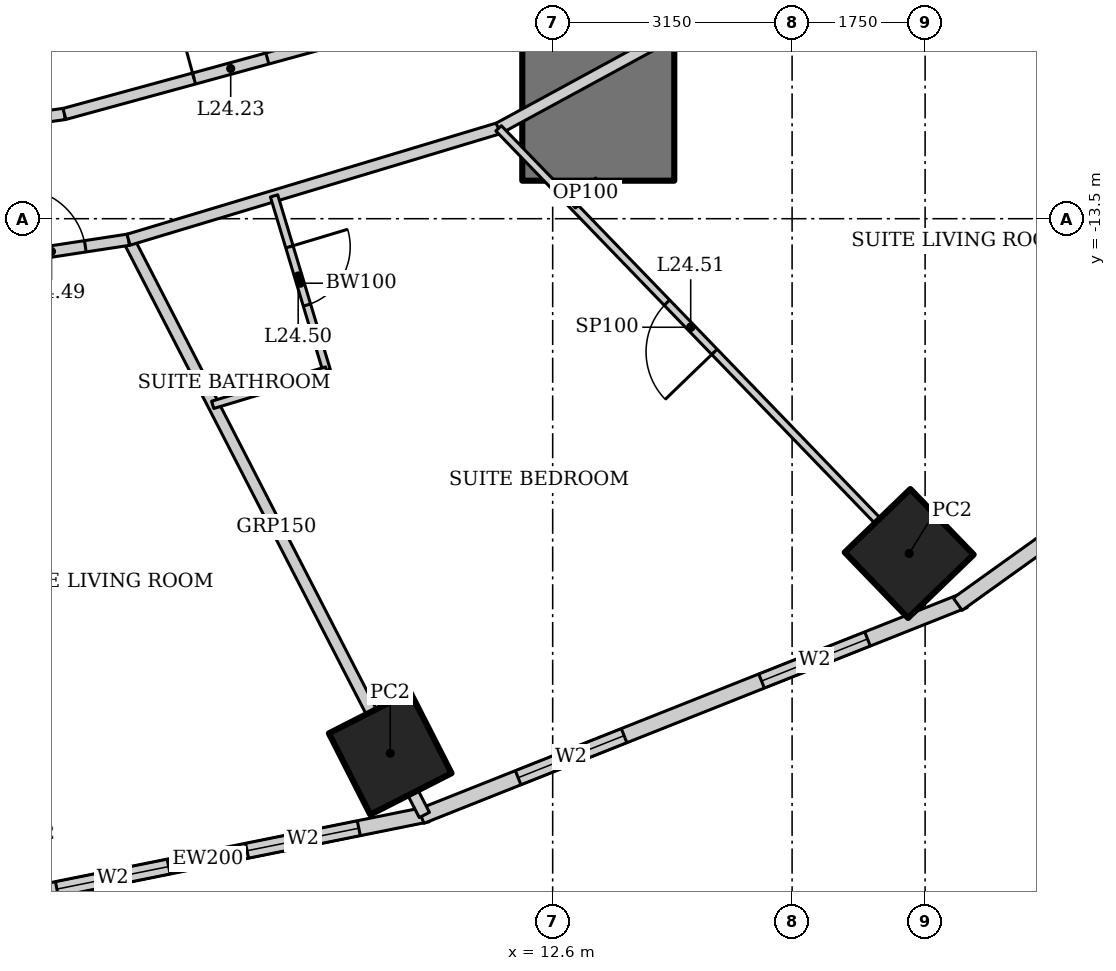
"""IFC4 building model, lengths in metres.
Left out: names, types, materials, properties, quantities, classifications, styles, units other than length and angle.
Written with IfcOpenShell. Run it as: python <this file> out.ifc"""

import sys

from ifc_helpers import new_model, si_unit, direction, frame, frame_2d, origin, origin_2d, place, context, subcontext, project, spatial, rectangle, hollow_rectangle, extrude, element, fill, save


model = new_model("IFC4")
c1 = context("Model", 3, precision=1e-05, world=origin(), true_north=direction((0.0, 1.0)))
c2 = subcontext(c1, "Body", "Model", "MODEL_VIEW")
j1 = project(units=[si_unit("LENGTHUNIT", "METRE"), si_unit("PLANEANGLEUNIT", "RADIAN")], contexts=[c1])
p1 = place(None, origin())
s1 = spatial("IfcSite", under=j1, at=p1, CompositionType="ELEMENT")
p2 = place(p1, origin())
s2 = spatial("IfcBuilding", under=s1, at=p2, CompositionType="ELEMENT")
p3 = place(p2, frame((0.0, 0.0, 101.8)))
s3 = spatial("IfcBuildingStorey", under=s2, at=p3, CompositionType="ELEMENT", Elevation=101.8)
for number, where, z_axis, x_axis in (
    (1, (10.463, -20.534, 0.0), (0.0, 0.0, 1.0), (0.891, 0.454, 0.0)),
    (2, (17.291, -17.905, 0.0), (0.0, 0.0, 1.0), (0.719, 0.695, 0.0)),
):
    element("IfcColumn", number, at=place(p3, frame(where, z_axis=z_axis, x_axis=x_axis)), inside=s3, PredefinedType="COLUMN", context=c2, shape_type="SweptSolid", body=[
        extrude(hollow_rectangle(XDim=1.2, YDim=1.2, WallThickness=0.1, at=origin_2d()), origin(), (0.0, 0.0, 1.0), 2.28),
    ])
p4 = place(p3, frame((13.2, -13.0, 0.0), z_axis=(0.0, 0.0, 1.0), x_axis=(0.0, 1.0, 0.0)))
e3 = element("IfcWall", 3, at=p4, inside=s3, PredefinedType="SHEAR", context=c2, shape_type="SweptSolid", body=[
    extrude(rectangle(XDim=26.0, YDim=2.0, at=frame_2d((13.0, 0.0))), origin(), (0.0, 0.0, 1.0), 3.6),
])
p5 = place(p4, frame((12.1, 0.0, 0.0)))
e4 = element("IfcOpeningElement", 4, at=p5, cuts=e3, PredefinedType="OPENING", context=c2, shape_type="SweptSolid", body=[
    extrude(rectangle(XDim=1.8, YDim=2.1, at=frame_2d((0.9, 1.05))), frame((0.0, 1.01, 0.0), z_axis=(0.0, -1.0, 0.0), x_axis=(1.0, 0.0, 0.0)), (0.0, 0.0, 1.0), 2.02),
])
p6 = place(p3, frame((5.17, -22.504, 0.0), z_axis=(0.0, 0.0, 1.0), x_axis=(0.980251657452, 0.197754110105, 0.0)))
e5 = element("IfcWall", 5, at=p6, inside=s3, PredefinedType="SOLIDWALL", context=c2, shape_type="SweptSolid", body=[
    extrude(rectangle(XDim=5.904, YDim=0.2, at=frame_2d((2.952, 0.0))), origin(), (0.0, 0.0, 1.0), 3.4),
])
p7 = place(p6, frame((0.926, 0.0, 0.5)))
e6 = element("IfcOpeningElement", 6, at=p7, cuts=e5, PredefinedType="OPENING", context=c2, shape_type="SweptSolid", body=[
    extrude(rectangle(XDim=1.5, YDim=2.2, at=frame_2d((0.75, 1.1))), frame((0.0, 0.11, 0.0), z_axis=(0.0, -1.0, 0.0), x_axis=(1.0, 0.0, 0.0)), (0.0, 0.0, 1.0), 0.22),
])
p8 = place(p6, frame((3.478, 0.0, 0.5)))
e7 = element("IfcOpeningElement", 7, at=p8, cuts=e5, PredefinedType="OPENING", context=c2, shape_type="SweptSolid", body=[
    extrude(rectangle(XDim=1.5, YDim=2.2, at=frame_2d((0.75, 1.1))), frame((0.0, 0.11, 0.0), z_axis=(0.0, -1.0, 0.0), x_axis=(1.0, 0.0, 0.0)), (0.0, 0.0, 1.0), 0.22),
])
p9 = place(p3, frame((10.869, -21.363, 0.0), z_axis=(0.0, 0.0, 1.0), x_axis=(0.929358351251, 0.369178892895, 0.0)))
e8 = element("IfcWall", 8, at=p9, inside=s3, PredefinedType="SOLIDWALL", context=c2, shape_type="SweptSolid", body=[
    extrude(rectangle(XDim=7.692, YDim=0.2, at=frame_2d((3.846, 0.0))), origin(), (0.0, 0.0, 1.0), 3.4),
])
p10 = place(p9, frame((1.373, 0.0, 0.5)))
e9 = element("IfcOpeningElement", 9, at=p10, cuts=e8, PredefinedType="OPENING", context=c2, shape_type="SweptSolid", body=[
    extrude(rectangle(XDim=1.5, YDim=2.2, at=frame_2d((0.75, 1.1))), frame((0.0, 0.11, 0.0), z_axis=(0.0, -1.0, 0.0), x_axis=(1.0, 0.0, 0.0)), (0.0, 0.0, 1.0), 0.22),
])
p11 = place(p9, frame((4.819, 0.0, 0.5)))
e10 = element("IfcOpeningElement", 10, at=p11, cuts=e8, PredefinedType="OPENING", context=c2, shape_type="SweptSolid", body=[
    extrude(rectangle(XDim=1.5, YDim=2.2, at=frame_2d((0.75, 1.1))), frame((0.0, 0.11, 0.0), z_axis=(0.0, -1.0, 0.0), x_axis=(1.0, 0.0, 0.0)), (0.0, 0.0, 1.0), 0.22),
])
p12 = place(p3, frame((17.929, -18.572, 0.0), z_axis=(0.0, 0.0, 1.0), x_axis=(0.812791321576, 0.582554948112, 0.0)))
e11 = element("IfcWall", 11, at=p12, inside=s3, PredefinedType="SOLIDWALL", context=c2, shape_type="SweptSolid", body=[
    extrude(rectangle(XDim=8.063, YDim=0.2, at=frame_2d((4.032, 0.0))), origin(), (0.0, 0.0, 1.0), 3.4),
])
p13 = place(p12, frame((1.466, 0.0, 0.5)))
e12 = element("IfcOpeningElement", 12, at=p13, cuts=e11, PredefinedType="OPENING", context=c2, shape_type="SweptSolid", body=[
    extrude(rectangle(XDim=1.5, YDim=2.2, at=frame_2d((0.75, 1.1))), frame((0.0, 0.11, 0.0), z_axis=(0.0, -1.0, 0.0), x_axis=(1.0, 0.0, 0.0)), (0.0, 0.0, 1.0), 0.22),
])
p14 = place(p12, frame((5.097, 0.0, 0.5)))
e13 = element("IfcOpeningElement", 13, at=p14, cuts=e11, PredefinedType="OPENING", context=c2, shape_type="SweptSolid", body=[
    extrude(rectangle(XDim=1.5, YDim=2.2, at=frame_2d((0.75, 1.1))), frame((0.0, 0.11, 0.0), z_axis=(0.0, -1.0, 0.0), x_axis=(1.0, 0.0, 0.0)), (0.0, 0.0, 1.0), 0.22),
])
p15 = place(p3, frame((10.912, -21.346, 0.0), z_axis=(0.0, 0.0, 1.0), x_axis=(-0.457327273085, 0.889298468059, 0.0)))
e14 = element("IfcWall", 14, at=p15, inside=s3, PredefinedType="PARTITIONING", context=c2, shape_type="SweptSolid", body=[
    extrude(rectangle(XDim=8.511, YDim=0.15, at=frame_2d((4.256, 0.0))), origin(), (0.0, 0.0, 1.0), 2.463),
])
p16 = place(p3, frame((3.311, -14.342, 0.0), z_axis=(0.0, 0.0, 1.0), x_axis=(0.988564270062, 0.150800145746, 0.0)))
e15 = element("IfcWall", 15, at=p16, inside=s3, PredefinedType="PARTITIONING", context=c2, shape_type="SweptSolid", body=[
    extrude(rectangle(XDim=3.751, YDim=0.15, at=frame_2d((1.875, 0.0))), origin(), (0.0, 0.0, 1.0), 3.4),
])
p17 = place(p16, frame((2.276, 0.0, 0.0)))
e16 = element("IfcOpeningElement", 16, at=p17, cuts=e15, PredefinedType="OPENING", context=c2, shape_type="SweptSolid", body=[
    extrude(rectangle(XDim=0.9, YDim=2.1, at=frame_2d((0.45, 1.05))), frame((0.0, 0.085, 0.0), z_axis=(0.0, -1.0, 0.0), x_axis=(1.0, 0.0, 0.0)), (0.0, 0.0, 1.0), 0.17),
])
p18 = place(p3, frame((7.019, -13.776, 0.0), z_axis=(0.0, 0.0, 1.0), x_axis=(0.957564241242, 0.288219922793, 0.0)))
e17 = element("IfcWall", 17, at=p18, inside=s3, PredefinedType="PARTITIONING", context=c2, shape_type="SweptSolid", body=[
    extrude(rectangle(XDim=5.085, YDim=0.15, at=frame_2d((2.542, 0.0))), origin(), (0.0, 0.0, 1.0), 3.4),
])
p19 = place(p3, frame((11.888, -12.311, 0.0), z_axis=(0.0, 0.0, 1.0), x_axis=(0.878450059298, 0.477834169267, 0.0)))
e18 = element("IfcWall", 18, at=p19, inside=s3, PredefinedType="PARTITIONING", context=c2, shape_type="SweptSolid", body=[
    extrude(rectangle(XDim=5.631, YDim=0.15, at=frame_2d((2.815, 0.0))), origin(), (0.0, 0.0, 1.0), 3.4),
])
p20 = place(p3, frame((2.903, -12.574, 0.0), z_axis=(0.0, 0.0, 1.0), x_axis=(0.990563451353, 0.137054911782, 0.0)))
e19 = element("IfcWall", 19, at=p20, inside=s3, PredefinedType="PARTITIONING", context=c2, shape_type="SweptSolid", body=[
    extrude(rectangle(XDim=3.304, YDim=0.15, at=frame_2d((1.652, 0.0))), origin(), (0.0, 0.0, 1.0), 3.4),
])
p21 = place(p3, frame((6.176, -12.122, 0.0), z_axis=(0.0, 0.0, 1.0), x_axis=(0.964644466646, 0.263554648923, 0.0)))
e20 = element("IfcWall", 20, at=p21, inside=s3, PredefinedType="PARTITIONING", context=c2, shape_type="SweptSolid", body=[
    extrude(rectangle(XDim=4.535, YDim=0.15, at=frame_2d((2.268, 0.0))), origin(), (0.0, 0.0, 1.0), 3.4),
])
p22 = place(p21, frame((1.768, 0.0, 0.0)))
e21 = element("IfcOpeningElement", 21, at=p22, cuts=e20, PredefinedType="OPENING", context=c2, shape_type="SweptSolid", body=[
    extrude(rectangle(XDim=1.0, YDim=2.1, at=frame_2d((0.5, 1.05))), frame((0.0, 0.085, 0.0), z_axis=(0.0, -1.0, 0.0), x_axis=(1.0, 0.0, 0.0)), (0.0, 0.0, 1.0), 0.17),
])
p23 = place(p3, frame((8.935, -13.2, 0.0), z_axis=(0.0, 0.0, 1.0), x_axis=(0.288197066254, -0.957571120598, 0.0)))
e22 = element("IfcWall", 22, at=p23, inside=s3, PredefinedType="PARTITIONING", context=c2, shape_type="SweptSolid", body=[
    extrude(rectangle(XDim=2.4, YDim=0.1, at=frame_2d((1.2, 0.0))), origin(), (0.0, 0.0, 1.0), 3.4),
])
p24 = place(p23, frame((0.7, 0.0, 0.0)))
e23 = element("IfcOpeningElement", 23, at=p24, cuts=e22, PredefinedType="OPENING", context=c2, shape_type="SweptSolid", body=[
    extrude(rectangle(XDim=0.8, YDim=2.1, at=frame_2d((0.4, 1.05))), frame((0.0, 0.06, 0.0), z_axis=(0.0, -1.0, 0.0), x_axis=(1.0, 0.0, 0.0)), (0.0, 0.0, 1.0), 0.12),
])
p25 = place(p3, frame((9.626, -15.498, 0.0), z_axis=(0.0, 0.0, 1.0), x_axis=(-0.957551231109, -0.288263143328, 0.0)))
e24 = element("IfcWall", 24, at=p25, inside=s3, PredefinedType="PARTITIONING", context=c2, shape_type="SweptSolid", body=[
    extrude(rectangle(XDim=1.566, YDim=0.1, at=frame_2d((0.783, 0.0))), origin(), (0.0, 0.0, 1.0), 3.4),
])
p26 = place(p3, frame((16.944, -17.545, 0.0), z_axis=(0.0, 0.0, 1.0), x_axis=(-0.694669949151, 0.719328618746, 0.0)))
e25 = element("IfcWall", 25, at=p26, inside=s3, PredefinedType="PARTITIONING", context=c2, shape_type="SweptSolid", body=[
    extrude(rectangle(XDim=7.277, YDim=0.1, at=frame_2d((3.639, 0.0))), origin(), (0.0, 0.0, 1.0), 2.463),
])
p27 = place(p26, frame((3.189, 0.0, 0.0)))
e26 = element("IfcOpeningElement", 26, at=p27, cuts=e25, PredefinedType="OPENING", context=c2, shape_type="SweptSolid", body=[
    extrude(rectangle(XDim=0.9, YDim=2.1, at=frame_2d((0.45, 1.05))), frame((0.0, 0.06, 0.0), z_axis=(0.0, -1.0, 0.0), x_axis=(1.0, 0.0, 0.0)), (0.0, 0.0, 1.0), 0.12),
])
p28 = place(p3, frame((23.171, -13.24, 0.0), z_axis=(0.0, 0.0, 1.0), x_axis=(-0.868253436131, 0.496120923412, 0.0)))
e27 = element("IfcWall", 27, at=p28, inside=s3, PredefinedType="PARTITIONING", context=c2, shape_type="SweptSolid", body=[
    extrude(rectangle(XDim=7.297, YDim=0.1, at=frame_2d((3.649, 0.0))), origin(), (0.0, 0.0, 1.0), 2.2),
])
p29 = place(p28, frame((3.198, 0.0, 0.0)))
e28 = element("IfcOpeningElement", 28, at=p29, cuts=e27, PredefinedType="OPENING", context=c2, shape_type="SweptSolid", body=[
    extrude(rectangle(XDim=0.9, YDim=2.1, at=frame_2d((0.45, 1.05))), frame((0.0, 0.06, 0.0), z_axis=(0.0, -1.0, 0.0), x_axis=(1.0, 0.0, 0.0)), (0.0, 0.0, 1.0), 0.12),
])
p30 = place(p3, frame((13.2, -13.0, 0.0), z_axis=(0.0, 0.0, 1.0), x_axis=(-0.719347134512, -0.69465077562, 0.0)))
e29 = element("IfcWall", 29, at=p30, inside=s3, PredefinedType="PARTITIONING", context=c2, shape_type="SweptSolid", body=[
    extrude(rectangle(XDim=0.465, YDim=0.1, at=frame_2d((0.232, 0.0))), origin(), (0.0, 0.0, 1.0), 3.4),
])
p31 = place(p7, origin())
e30 = element("IfcWindow", 30, at=p31, inside=s3, PartitioningType="SINGLE_PANEL", PredefinedType="WINDOW", context=c2, shape_type="SweptSolid", body=[
    extrude(rectangle(XDim=1.5, YDim=2.2, at=frame_2d((0.75, 1.1))), frame((0.0, 0.03, 0.0), z_axis=(0.0, -1.0, 0.0), x_axis=(1.0, 0.0, 0.0)), (0.0, 0.0, 1.0), 0.06),
])
fill(e6, e30)
p32 = place(p8, origin())
e31 = element("IfcWindow", 31, at=p32, inside=s3, PartitioningType="SINGLE_PANEL", PredefinedType="WINDOW", context=c2, shape_type="SweptSolid", body=[
    extrude(rectangle(XDim=1.5, YDim=2.2, at=frame_2d((0.75, 1.1))), frame((0.0, 0.03, 0.0), z_axis=(0.0, -1.0, 0.0), x_axis=(1.0, 0.0, 0.0)), (0.0, 0.0, 1.0), 0.06),
])
fill(e7, e31)
p33 = place(p10, origin())
e32 = element("IfcWindow", 32, at=p33, inside=s3, PartitioningType="SINGLE_PANEL", PredefinedType="WINDOW", context=c2, shape_type="SweptSolid", body=[
    extrude(rectangle(XDim=1.5, YDim=2.2, at=frame_2d((0.75, 1.1))), frame((0.0, 0.03, 0.0), z_axis=(0.0, -1.0, 0.0), x_axis=(1.0, 0.0, 0.0)), (0.0, 0.0, 1.0), 0.06),
])
fill(e9, e32)
p34 = place(p11, origin())
e33 = element("IfcWindow", 33, at=p34, inside=s3, PartitioningType="SINGLE_PANEL", PredefinedType="WINDOW", context=c2, shape_type="SweptSolid", body=[
    extrude(rectangle(XDim=1.5, YDim=2.2, at=frame_2d((0.75, 1.1))), frame((0.0, 0.03, 0.0), z_axis=(0.0, -1.0, 0.0), x_axis=(1.0, 0.0, 0.0)), (0.0, 0.0, 1.0), 0.06),
])
fill(e10, e33)
p35 = place(p22, origin())
e34 = element("IfcDoor", 34, at=p35, inside=s3, OperationType="SINGLE_SWING_LEFT", PredefinedType="DOOR", context=c2, shape_type="SweptSolid", body=[
    extrude(rectangle(XDim=1.0, YDim=2.1, at=frame_2d((0.5, 1.05))), frame((0.0, 0.025, 0.0), z_axis=(0.0, -1.0, 0.0), x_axis=(1.0, 0.0, 0.0)), (0.0, 0.0, 1.0), 0.05),
])
fill(e21, e34)
p36 = place(p17, origin())
e35 = element("IfcDoor", 35, at=p36, inside=s3, OperationType="SINGLE_SWING_LEFT", PredefinedType="DOOR", context=c2, shape_type="SweptSolid", body=[
    extrude(rectangle(XDim=0.9, YDim=2.1, at=frame_2d((0.45, 1.05))), frame((0.0, 0.025, 0.0), z_axis=(0.0, -1.0, 0.0), x_axis=(1.0, 0.0, 0.0)), (0.0, 0.0, 1.0), 0.05),
])
fill(e16, e35)
p37 = place(p24, origin())
e36 = element("IfcDoor", 36, at=p37, inside=s3, OperationType="SINGLE_SWING_LEFT", PredefinedType="DOOR", context=c2, shape_type="SweptSolid", body=[
    extrude(rectangle(XDim=0.8, YDim=2.1, at=frame_2d((0.4, 1.05))), frame((0.0, 0.025, 0.0), z_axis=(0.0, -1.0, 0.0), x_axis=(1.0, 0.0, 0.0)), (0.0, 0.0, 1.0), 0.05),
])
fill(e23, e36)
p38 = place(p27, origin())
e37 = element("IfcDoor", 37, at=p38, inside=s3, OperationType="SINGLE_SWING_LEFT", PredefinedType="DOOR", context=c2, shape_type="SweptSolid", body=[
    extrude(rectangle(XDim=0.9, YDim=2.1, at=frame_2d((0.45, 1.05))), frame((0.0, 0.025, 0.0), z_axis=(0.0, -1.0, 0.0), x_axis=(1.0, 0.0, 0.0)), (0.0, 0.0, 1.0), 0.05),
])
fill(e26, e37)
save(model, sys.argv[1])
